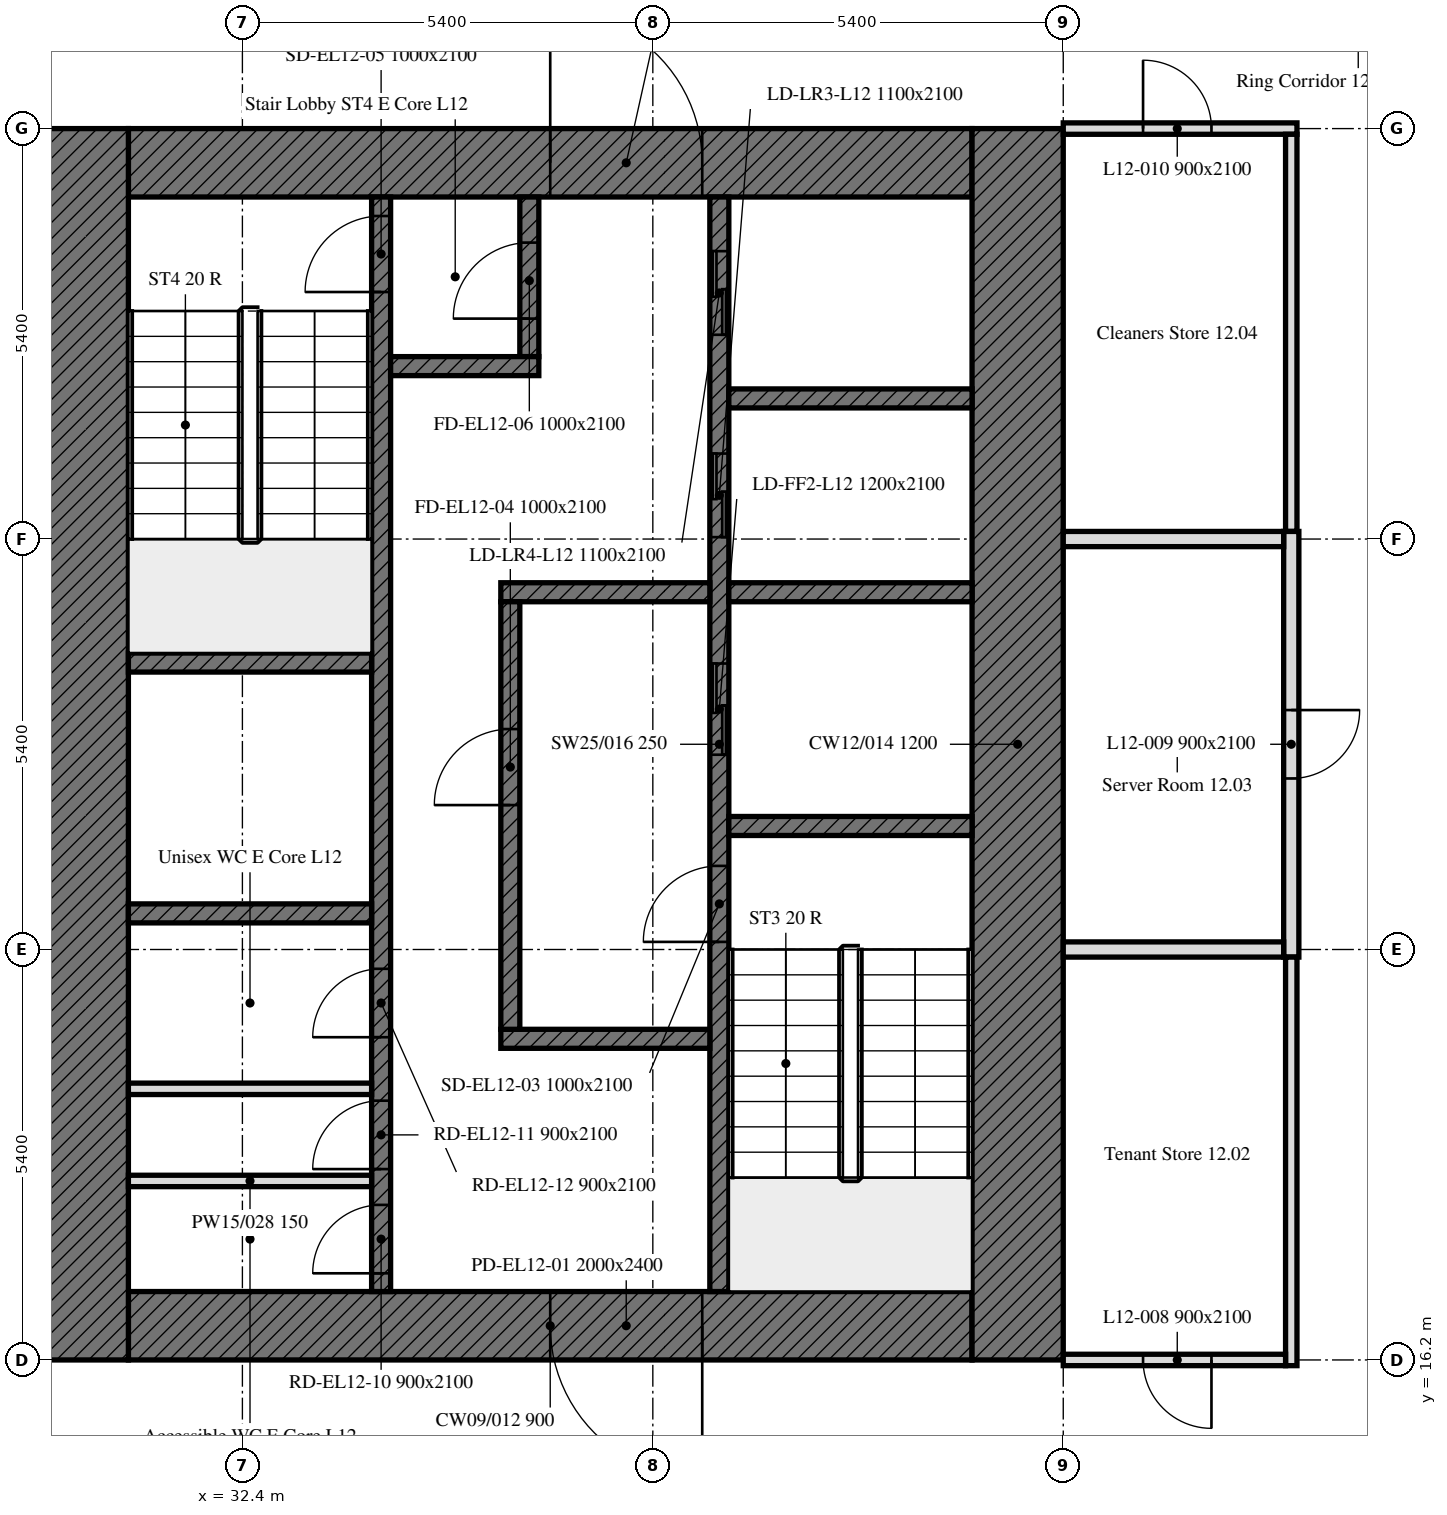
"""IFC4 building model, lengths in metres.
Left out: names, types, materials, properties, quantities, classifications, styles, units other than length and angle.
Written with IfcOpenShell. Run it as: python <this file> out.ifc"""

import sys

from ifc_helpers import new_model, si_unit, direction, frame, frame_2d, origin, place, context, subcontext, project, spatial, rectangle, extrude, element, fill, save


model = new_model("IFC4")
c1 = context("Model", 3, precision=1e-05, world=origin(), true_north=direction((0.0, 1.0)))
c2 = subcontext(c1, "Body", "Model", "MODEL_VIEW")
j1 = project(units=[si_unit("LENGTHUNIT", "METRE"), si_unit("PLANEANGLEUNIT", "RADIAN")], contexts=[c1])
p1 = place(None, origin())
s1 = spatial("IfcSite", under=j1, at=p1, CompositionType="ELEMENT")
p2 = place(p1, origin())
s2 = spatial("IfcBuilding", under=s1, at=p2, CompositionType="ELEMENT")
p3 = place(p2, frame((0.0, 0.0, 56.4)))
s3 = spatial("IfcBuildingStorey", under=s2, at=p3, CompositionType="ELEMENT", Elevation=56.4)
p4 = place(p3, frame((42.0, 16.65, 0.0), z_axis=(0.0, 0.0, 1.0), x_axis=(-1.0, 0.0, 0.0)))
e1 = element("IfcWall", 1, at=p4, inside=s3, PredefinedType="SOLIDWALL", context=c2, shape_type="SweptSolid", body=[
    extrude(rectangle(XDim=11.1, YDim=0.9, at=frame_2d((5.55, 0.0))), origin(), (0.0, 0.0, 1.0), 3.3),
])
p5 = place(p4, frame((3.55, 0.0, 0.0)))
e2 = element("IfcOpeningElement", 2, at=p5, cuts=e1, PredefinedType="OPENING", context=c2, shape_type="SweptSolid", body=[
    extrude(rectangle(XDim=2.0, YDim=2.4, at=frame_2d((1.0, 1.2))), frame((0.0, 0.45, 0.0), z_axis=(0.0, -1.0, 0.0), x_axis=(1.0, 0.0, 0.0)), (0.0, 0.0, 1.0), 0.9),
])
p6 = place(p3, frame((30.9, 31.95, 0.0), z_axis=(0.0, 0.0, 1.0), x_axis=(1.0, 0.0, 0.0)))
e3 = element("IfcWall", 3, at=p6, inside=s3, PredefinedType="SOLIDWALL", context=c2, shape_type="SweptSolid", body=[
    extrude(rectangle(XDim=11.1, YDim=0.9, at=frame_2d((5.55, 0.0))), origin(), (0.0, 0.0, 1.0), 3.3),
])
p7 = place(p6, frame((5.55, 0.0, 0.0)))
e4 = element("IfcOpeningElement", 4, at=p7, cuts=e3, PredefinedType="OPENING", context=c2, shape_type="SweptSolid", body=[
    extrude(rectangle(XDim=2.0, YDim=2.4, at=frame_2d((1.0, 1.2))), frame((0.0, 0.45, 0.0), z_axis=(0.0, -1.0, 0.0), x_axis=(1.0, 0.0, 0.0)), (0.0, 0.0, 1.0), 0.9),
])
for number, where, z_axis, x_axis in (
    (5, (42.6, 32.4, 0.0), (0.0, 0.0, 1.0), (0.0, -1.0, 0.0)),
    (6, (30.3, 16.2, 0.0), (0.0, 0.0, 1.0), (0.0, 1.0, 0.0)),
):
    element("IfcWall", number, at=place(p3, frame(where, z_axis=z_axis, x_axis=x_axis)), inside=s3, PredefinedType="SOLIDWALL", context=c2, shape_type="SweptSolid", body=[
        extrude(rectangle(XDim=16.2, YDim=1.2, at=frame_2d((8.1, 0.0))), origin(), (0.0, 0.0, 1.0), 3.3),
    ])
p8 = place(p3, frame((38.675, 17.1, 0.0), z_axis=(0.0, 0.0, 1.0), x_axis=(0.0, 1.0, 0.0)))
e7 = element("IfcWall", 7, at=p8, inside=s3, PredefinedType="SOLIDWALL", context=c2, shape_type="SweptSolid", body=[
    extrude(rectangle(XDim=14.4, YDim=0.25, at=frame_2d((7.2, 0.0))), origin(), (0.0, 0.0, 1.0), 3.3),
])
p9 = place(p8, frame((4.6, 0.0, 0.0)))
e8 = element("IfcOpeningElement", 8, at=p9, cuts=e7, PredefinedType="OPENING", context=c2, shape_type="SweptSolid", body=[
    extrude(rectangle(XDim=1.0, YDim=2.1, at=frame_2d((0.5, 1.05))), frame((0.0, 0.125, 0.0), z_axis=(0.0, -1.0, 0.0), x_axis=(1.0, 0.0, 0.0)), (0.0, 0.0, 1.0), 0.25),
])
p10 = place(p8, frame((7.062, 0.0, 0.0)))
e9 = element("IfcOpeningElement", 9, at=p10, cuts=e7, PredefinedType="OPENING", context=c2, shape_type="SweptSolid", body=[
    extrude(rectangle(XDim=1.2, YDim=2.1, at=frame_2d((0.6, 1.05))), frame((0.0, 0.125, 0.0), z_axis=(0.0, -1.0, 0.0), x_axis=(1.0, 0.0, 0.0)), (0.0, 0.0, 1.0), 0.25),
])
p11 = place(p8, frame((9.925, 0.0, 0.0)))
e10 = element("IfcOpeningElement", 10, at=p11, cuts=e7, PredefinedType="OPENING", context=c2, shape_type="SweptSolid", body=[
    extrude(rectangle(XDim=1.1, YDim=2.1, at=frame_2d((0.55, 1.05))), frame((0.0, 0.125, 0.0), z_axis=(0.0, -1.0, 0.0), x_axis=(1.0, 0.0, 0.0)), (0.0, 0.0, 1.0), 0.25),
])
p12 = place(p8, frame((12.587, 0.0, 0.0)))
e11 = element("IfcOpeningElement", 11, at=p12, cuts=e7, PredefinedType="OPENING", context=c2, shape_type="SweptSolid", body=[
    extrude(rectangle(XDim=1.1, YDim=2.1, at=frame_2d((0.55, 1.05))), frame((0.0, 0.125, 0.0), z_axis=(0.0, -1.0, 0.0), x_axis=(1.0, 0.0, 0.0)), (0.0, 0.0, 1.0), 0.25),
])
p13 = place(p3, frame((34.225, 17.1, 0.0), z_axis=(0.0, 0.0, 1.0), x_axis=(0.0, 1.0, 0.0)))
e12 = element("IfcWall", 12, at=p13, inside=s3, PredefinedType="SOLIDWALL", context=c2, shape_type="SweptSolid", body=[
    extrude(rectangle(XDim=14.4, YDim=0.25, at=frame_2d((7.2, 0.0))), origin(), (0.0, 0.0, 1.0), 3.3),
])
p14 = place(p13, frame((13.15, 0.0, 0.0)))
e13 = element("IfcOpeningElement", 13, at=p14, cuts=e12, PredefinedType="OPENING", context=c2, shape_type="SweptSolid", body=[
    extrude(rectangle(XDim=1.0, YDim=2.1, at=frame_2d((0.5, 1.05))), frame((0.0, 0.125, 0.0), z_axis=(0.0, -1.0, 0.0), x_axis=(1.0, 0.0, 0.0)), (0.0, 0.0, 1.0), 0.25),
])
p15 = place(p13, frame((0.24, 0.0, 0.0)))
e14 = element("IfcOpeningElement", 14, at=p15, cuts=e12, PredefinedType="OPENING", context=c2, shape_type="SweptSolid", body=[
    extrude(rectangle(XDim=0.9, YDim=2.1, at=frame_2d((0.45, 1.05))), frame((0.0, 0.125, 0.0), z_axis=(0.0, -1.0, 0.0), x_axis=(1.0, 0.0, 0.0)), (0.0, 0.0, 1.0), 0.25),
])
p16 = place(p13, frame((1.611, 0.0, 0.0)))
e15 = element("IfcOpeningElement", 15, at=p16, cuts=e12, PredefinedType="OPENING", context=c2, shape_type="SweptSolid", body=[
    extrude(rectangle(XDim=0.9, YDim=2.1, at=frame_2d((0.45, 1.05))), frame((0.0, 0.125, 0.0), z_axis=(0.0, -1.0, 0.0), x_axis=(1.0, 0.0, 0.0)), (0.0, 0.0, 1.0), 0.25),
])
p17 = place(p13, frame((3.346, 0.0, 0.0)))
e16 = element("IfcOpeningElement", 16, at=p17, cuts=e12, PredefinedType="OPENING", context=c2, shape_type="SweptSolid", body=[
    extrude(rectangle(XDim=0.9, YDim=2.1, at=frame_2d((0.45, 1.05))), frame((0.0, 0.125, 0.0), z_axis=(0.0, -1.0, 0.0), x_axis=(1.0, 0.0, 0.0)), (0.0, 0.0, 1.0), 0.25),
])
p18 = place(p3, frame((38.8, 23.225, 0.0), z_axis=(0.0, 0.0, 1.0), x_axis=(1.0, 0.0, 0.0)))
e17 = element("IfcWall", 17, at=p18, inside=s3, PredefinedType="SOLIDWALL", context=c2, shape_type="SweptSolid", body=[
    extrude(rectangle(XDim=3.2, YDim=0.25, at=frame_2d((1.6, 0.0))), origin(), (0.0, 0.0, 1.0), 3.3),
])
for number, where, z_axis, x_axis in (
    (18, (30.9, 25.375, 0.0), (0.0, 0.0, 1.0), (1.0, 0.0, 0.0)),
    (19, (30.9, 22.075, 0.0), (0.0, 0.0, 1.0), (1.0, 0.0, 0.0)),
):
    element("IfcWall", number, at=place(p3, frame(where, z_axis=z_axis, x_axis=x_axis)), inside=s3, PredefinedType="SOLIDWALL", context=c2, shape_type="SweptSolid", body=[
        extrude(rectangle(XDim=3.2, YDim=0.25, at=frame_2d((1.6, 0.0))), origin(), (0.0, 0.0, 1.0), 3.3),
    ])
p19 = place(p3, frame((38.8, 26.3, 0.0), z_axis=(0.0, 0.0, 1.0), x_axis=(1.0, 0.0, 0.0)))
e20 = element("IfcWall", 20, at=p19, inside=s3, PredefinedType="SOLIDWALL", context=c2, shape_type="SweptSolid", body=[
    extrude(rectangle(XDim=3.2, YDim=0.25, at=frame_2d((1.6, 0.0))), origin(), (0.0, 0.0, 1.0), 3.3),
])
for number, where, z_axis, x_axis in (
    (21, (35.8, 26.3, 0.0), (0.0, 0.0, 1.0), (1.0, 0.0, 0.0)),
    (22, (35.8, 20.425, 0.0), (0.0, 0.0, 1.0), (1.0, 0.0, 0.0)),
):
    element("IfcWall", number, at=place(p3, frame(where, z_axis=z_axis, x_axis=x_axis)), inside=s3, PredefinedType="SOLIDWALL", context=c2, shape_type="SweptSolid", body=[
        extrude(rectangle(XDim=2.75, YDim=0.25, at=frame_2d((1.375, 0.0))), origin(), (0.0, 0.0, 1.0), 3.3),
    ])
p20 = place(p3, frame((36.175, 29.4, 0.0), z_axis=(0.0, 0.0, 1.0), x_axis=(0.0, 1.0, 0.0)))
e23 = element("IfcWall", 23, at=p20, inside=s3, PredefinedType="SOLIDWALL", context=c2, shape_type="SweptSolid", body=[
    extrude(rectangle(XDim=2.1, YDim=0.25, at=frame_2d((1.05, 0.0))), origin(), (0.0, 0.0, 1.0), 3.3),
])
p21 = place(p20, frame((0.5, 0.0, 0.0)))
e24 = element("IfcOpeningElement", 24, at=p21, cuts=e23, PredefinedType="OPENING", context=c2, shape_type="SweptSolid", body=[
    extrude(rectangle(XDim=1.0, YDim=2.1, at=frame_2d((0.5, 1.05))), frame((0.0, 0.125, 0.0), z_axis=(0.0, -1.0, 0.0), x_axis=(1.0, 0.0, 0.0)), (0.0, 0.0, 1.0), 0.25),
])
p22 = place(p3, frame((34.35, 29.275, 0.0), z_axis=(0.0, 0.0, 1.0), x_axis=(1.0, 0.0, 0.0)))
e25 = element("IfcWall", 25, at=p22, inside=s3, PredefinedType="SOLIDWALL", context=c2, shape_type="SweptSolid", body=[
    extrude(rectangle(XDim=1.95, YDim=0.25, at=frame_2d((0.975, 0.0))), origin(), (0.0, 0.0, 1.0), 3.3),
])
p23 = place(p3, frame((35.925, 20.55, 0.0), z_axis=(0.0, 0.0, 1.0), x_axis=(0.0, 1.0, 0.0)))
e26 = element("IfcWall", 26, at=p23, inside=s3, PredefinedType="SOLIDWALL", context=c2, shape_type="SweptSolid", body=[
    extrude(rectangle(XDim=5.625, YDim=0.25, at=frame_2d((2.812, 0.0))), origin(), (0.0, 0.0, 1.0), 3.3),
])
p24 = place(p23, frame((2.95, 0.0, 0.0)))
e27 = element("IfcOpeningElement", 27, at=p24, cuts=e26, PredefinedType="OPENING", context=c2, shape_type="SweptSolid", body=[
    extrude(rectangle(XDim=1.0, YDim=2.1, at=frame_2d((0.5, 1.05))), frame((0.0, 0.125, 0.0), z_axis=(0.0, -1.0, 0.0), x_axis=(1.0, 0.0, 0.0)), (0.0, 0.0, 1.0), 0.25),
])
p25 = place(p3, frame((38.8, 28.85, 0.0), z_axis=(0.0, 0.0, 1.0), x_axis=(1.0, 0.0, 0.0)))
e28 = element("IfcWall", 28, at=p25, inside=s3, PredefinedType="SOLIDWALL", context=c2, shape_type="SweptSolid", body=[
    extrude(rectangle(XDim=3.2, YDim=0.25, at=frame_2d((1.6, 0.0))), origin(), (0.0, 0.0, 1.0), 3.3),
])
for number, where, z_axis, x_axis in (
    (29, (30.9, 18.555, 0.0), (0.0, 0.0, 1.0), (1.0, 0.0, 0.0)),
    (30, (30.9, 19.767, 0.0), (0.0, 0.0, 1.0), (1.0, 0.0, 0.0)),
):
    element("IfcWall", number, at=place(p3, frame(where, z_axis=z_axis, x_axis=x_axis)), inside=s3, PredefinedType="PARTITIONING", context=c2, shape_type="SweptSolid", body=[
        extrude(rectangle(XDim=3.2, YDim=0.15, at=frame_2d((1.6, 0.0))), origin(), (0.0, 0.0, 1.0), 3.3),
    ])
p26 = place(p3, frame((43.2, 32.4, 0.0), z_axis=(0.0, 0.0, 1.0), x_axis=(1.0, 0.0, 0.0)))
e31 = element("IfcWall", 31, at=p26, inside=s3, PredefinedType="PARTITIONING", context=c2, shape_type="SweptSolid", body=[
    extrude(rectangle(XDim=3.075, YDim=0.15, at=frame_2d((1.538, 0.0))), origin(), (0.0, 0.0, 1.0), 2.55),
])
p27 = place(p26, frame((1.05, 0.0, 0.0)))
e32 = element("IfcOpeningElement", 32, at=p27, cuts=e31, PredefinedType="OPENING", context=c2, shape_type="SweptSolid", body=[
    extrude(rectangle(XDim=0.9, YDim=2.1, at=frame_2d((0.45, 1.05))), frame((0.0, 0.075, 0.0), z_axis=(0.0, -1.0, 0.0), x_axis=(1.0, 0.0, 0.0)), (0.0, 0.0, 1.0), 0.15),
])
p28 = place(p3, frame((46.2, 32.325, 0.0), z_axis=(0.0, 0.0, 1.0), x_axis=(0.0, -1.0, 0.0)))
e33 = element("IfcWall", 33, at=p28, inside=s3, PredefinedType="PARTITIONING", context=c2, shape_type="SweptSolid", body=[
    extrude(rectangle(XDim=5.225, YDim=0.15, at=frame_2d((2.612, 0.0))), origin(), (0.0, 0.0, 1.0), 3.3),
])
p29 = place(p3, frame((46.2, 27.1, 0.0), z_axis=(0.0, 0.0, 1.0), x_axis=(0.0, -1.0, 0.0)))
e34 = element("IfcWall", 34, at=p29, inside=s3, PredefinedType="PARTITIONING", context=c2, shape_type="SweptSolid", body=[
    extrude(rectangle(XDim=5.6, YDim=0.2, at=frame_2d((2.8, 0.0))), origin(), (0.0, 0.0, 1.0), 3.3),
])
p30 = place(p29, frame((2.35, 0.0, 0.0)))
e35 = element("IfcOpeningElement", 35, at=p30, cuts=e34, PredefinedType="OPENING", context=c2, shape_type="SweptSolid", body=[
    extrude(rectangle(XDim=0.9, YDim=2.1, at=frame_2d((0.45, 1.05))), frame((0.0, 0.1, 0.0), z_axis=(0.0, -1.0, 0.0), x_axis=(1.0, 0.0, 0.0)), (0.0, 0.0, 1.0), 0.2),
])
p31 = place(p3, frame((46.2, 21.5, 0.0), z_axis=(0.0, 0.0, 1.0), x_axis=(0.0, -1.0, 0.0)))
e36 = element("IfcWall", 36, at=p31, inside=s3, PredefinedType="PARTITIONING", context=c2, shape_type="SweptSolid", body=[
    extrude(rectangle(XDim=5.375, YDim=0.15, at=frame_2d((2.688, 0.0))), origin(), (0.0, 0.0, 1.0), 3.3),
])
p32 = place(p3, frame((46.125, 16.2, 0.0), z_axis=(0.0, 0.0, 1.0), x_axis=(-1.0, 0.0, 0.0)))
e37 = element("IfcWall", 37, at=p32, inside=s3, PredefinedType="PARTITIONING", context=c2, shape_type="SweptSolid", body=[
    extrude(rectangle(XDim=2.925, YDim=0.15, at=frame_2d((1.462, 0.0))), origin(), (0.0, 0.0, 1.0), 2.55),
])
p33 = place(p32, frame((0.975, 0.0, 0.0)))
e38 = element("IfcOpeningElement", 38, at=p33, cuts=e37, PredefinedType="OPENING", context=c2, shape_type="SweptSolid", body=[
    extrude(rectangle(XDim=0.9, YDim=2.1, at=frame_2d((0.45, 1.05))), frame((0.0, 0.075, 0.0), z_axis=(0.0, -1.0, 0.0), x_axis=(1.0, 0.0, 0.0)), (0.0, 0.0, 1.0), 0.15),
])
for number, where, z_axis, x_axis in (
    (39, (46.1, 21.6, 0.0), (0.0, 0.0, 1.0), (-1.0, 0.0, 0.0)),
    (40, (46.1, 27.0, 0.0), (0.0, 0.0, 1.0), (-1.0, 0.0, 0.0)),
):
    element("IfcWall", number, at=place(p3, frame(where, z_axis=z_axis, x_axis=x_axis)), inside=s3, PredefinedType="PARTITIONING", context=c2, shape_type="SweptSolid", body=[
        extrude(rectangle(XDim=2.9, YDim=0.2, at=frame_2d((1.45, 0.0))), origin(), (0.0, 0.0, 1.0), 2.55),
    ])
p34 = place(p5, origin())
e41 = element("IfcDoor", 41, at=p34, inside=s3, OperationType="DOUBLE_DOOR_SINGLE_SWING", PredefinedType="DOOR", context=c2, shape_type="SweptSolid", body=[
    extrude(rectangle(XDim=2.0, YDim=2.4, at=frame_2d((1.0, 1.2))), frame((0.0, 0.025, 0.0), z_axis=(0.0, -1.0, 0.0), x_axis=(1.0, 0.0, 0.0)), (0.0, 0.0, 1.0), 0.05),
])
fill(e2, e41)
p35 = place(p7, origin())
e42 = element("IfcDoor", 42, at=p35, inside=s3, OperationType="DOUBLE_DOOR_SINGLE_SWING", PredefinedType="DOOR", context=c2, shape_type="SweptSolid", body=[
    extrude(rectangle(XDim=2.0, YDim=2.4, at=frame_2d((1.0, 1.2))), frame((0.0, 0.025, 0.0), z_axis=(0.0, -1.0, 0.0), x_axis=(1.0, 0.0, 0.0)), (0.0, 0.0, 1.0), 0.05),
])
fill(e4, e42)
p36 = place(p9, origin())
e43 = element("IfcDoor", 43, at=p36, inside=s3, OperationType="SINGLE_SWING_LEFT", PredefinedType="DOOR", context=c2, shape_type="SweptSolid", body=[
    extrude(rectangle(XDim=1.0, YDim=2.1, at=frame_2d((0.5, 1.05))), frame((0.0, 0.025, 0.0), z_axis=(0.0, -1.0, 0.0), x_axis=(1.0, 0.0, 0.0)), (0.0, 0.0, 1.0), 0.05),
])
fill(e8, e43)
p37 = place(p24, origin())
e44 = element("IfcDoor", 44, at=p37, inside=s3, OperationType="SINGLE_SWING_LEFT", PredefinedType="DOOR", context=c2, shape_type="SweptSolid", body=[
    extrude(rectangle(XDim=1.0, YDim=2.1, at=frame_2d((0.5, 1.05))), frame((0.0, 0.025, 0.0), z_axis=(0.0, -1.0, 0.0), x_axis=(1.0, 0.0, 0.0)), (0.0, 0.0, 1.0), 0.05),
])
fill(e27, e44)
p38 = place(p14, origin())
e45 = element("IfcDoor", 45, at=p38, inside=s3, OperationType="SINGLE_SWING_LEFT", PredefinedType="DOOR", context=c2, shape_type="SweptSolid", body=[
    extrude(rectangle(XDim=1.0, YDim=2.1, at=frame_2d((0.5, 1.05))), frame((0.0, 0.025, 0.0), z_axis=(0.0, -1.0, 0.0), x_axis=(1.0, 0.0, 0.0)), (0.0, 0.0, 1.0), 0.05),
])
fill(e13, e45)
p39 = place(p21, origin())
e46 = element("IfcDoor", 46, at=p39, inside=s3, OperationType="SINGLE_SWING_LEFT", PredefinedType="DOOR", context=c2, shape_type="SweptSolid", body=[
    extrude(rectangle(XDim=1.0, YDim=2.1, at=frame_2d((0.5, 1.05))), frame((0.0, 0.025, 0.0), z_axis=(0.0, -1.0, 0.0), x_axis=(1.0, 0.0, 0.0)), (0.0, 0.0, 1.0), 0.05),
])
fill(e24, e46)
p40 = place(p10, origin())
e47 = element("IfcDoor", 47, at=p40, inside=s3, OperationType="DOUBLE_DOOR_SLIDING", PredefinedType="DOOR", context=c2, shape_type="SweptSolid", body=[
    extrude(rectangle(XDim=1.2, YDim=2.1, at=frame_2d((0.6, 1.05))), frame((0.0, 0.025, 0.0), z_axis=(0.0, -1.0, 0.0), x_axis=(1.0, 0.0, 0.0)), (0.0, 0.0, 1.0), 0.05),
])
fill(e9, e47)
p41 = place(p11, origin())
e48 = element("IfcDoor", 48, at=p41, inside=s3, OperationType="DOUBLE_DOOR_SLIDING", PredefinedType="DOOR", context=c2, shape_type="SweptSolid", body=[
    extrude(rectangle(XDim=1.1, YDim=2.1, at=frame_2d((0.55, 1.05))), frame((0.0, 0.025, 0.0), z_axis=(0.0, -1.0, 0.0), x_axis=(1.0, 0.0, 0.0)), (0.0, 0.0, 1.0), 0.05),
])
fill(e10, e48)
p42 = place(p12, origin())
e49 = element("IfcDoor", 49, at=p42, inside=s3, OperationType="DOUBLE_DOOR_SLIDING", PredefinedType="DOOR", context=c2, shape_type="SweptSolid", body=[
    extrude(rectangle(XDim=1.1, YDim=2.1, at=frame_2d((0.55, 1.05))), frame((0.0, 0.025, 0.0), z_axis=(0.0, -1.0, 0.0), x_axis=(1.0, 0.0, 0.0)), (0.0, 0.0, 1.0), 0.05),
])
fill(e11, e49)
p43 = place(p15, origin())
e50 = element("IfcDoor", 50, at=p43, inside=s3, OperationType="SINGLE_SWING_LEFT", PredefinedType="DOOR", context=c2, shape_type="SweptSolid", body=[
    extrude(rectangle(XDim=0.9, YDim=2.1, at=frame_2d((0.45, 1.05))), frame((0.0, 0.025, 0.0), z_axis=(0.0, -1.0, 0.0), x_axis=(1.0, 0.0, 0.0)), (0.0, 0.0, 1.0), 0.05),
])
fill(e14, e50)
p44 = place(p16, origin())
e51 = element("IfcDoor", 51, at=p44, inside=s3, OperationType="SINGLE_SWING_LEFT", PredefinedType="DOOR", context=c2, shape_type="SweptSolid", body=[
    extrude(rectangle(XDim=0.9, YDim=2.1, at=frame_2d((0.45, 1.05))), frame((0.0, 0.025, 0.0), z_axis=(0.0, -1.0, 0.0), x_axis=(1.0, 0.0, 0.0)), (0.0, 0.0, 1.0), 0.05),
])
fill(e15, e51)
p45 = place(p17, origin())
e52 = element("IfcDoor", 52, at=p45, inside=s3, OperationType="SINGLE_SWING_LEFT", PredefinedType="DOOR", context=c2, shape_type="SweptSolid", body=[
    extrude(rectangle(XDim=0.9, YDim=2.1, at=frame_2d((0.45, 1.05))), frame((0.0, 0.025, 0.0), z_axis=(0.0, -1.0, 0.0), x_axis=(1.0, 0.0, 0.0)), (0.0, 0.0, 1.0), 0.05),
])
fill(e16, e52)
p46 = place(p33, origin())
e53 = element("IfcDoor", 53, at=p46, inside=s3, OperationType="SINGLE_SWING_LEFT", PredefinedType="DOOR", context=c2, shape_type="SweptSolid", body=[
    extrude(rectangle(XDim=0.9, YDim=2.1, at=frame_2d((0.45, 1.05))), frame((0.0, 0.025, 0.0), z_axis=(0.0, -1.0, 0.0), x_axis=(1.0, 0.0, 0.0)), (0.0, 0.0, 1.0), 0.05),
])
fill(e38, e53)
p47 = place(p30, origin())
e54 = element("IfcDoor", 54, at=p47, inside=s3, OperationType="SINGLE_SWING_LEFT", PredefinedType="DOOR", context=c2, shape_type="SweptSolid", body=[
    extrude(rectangle(XDim=0.9, YDim=2.1, at=frame_2d((0.45, 1.05))), frame((0.0, 0.025, 0.0), z_axis=(0.0, -1.0, 0.0), x_axis=(1.0, 0.0, 0.0)), (0.0, 0.0, 1.0), 0.05),
])
fill(e35, e54)
p48 = place(p27, origin())
e55 = element("IfcDoor", 55, at=p48, inside=s3, OperationType="SINGLE_SWING_LEFT", PredefinedType="DOOR", context=c2, shape_type="SweptSolid", body=[
    extrude(rectangle(XDim=0.9, YDim=2.1, at=frame_2d((0.45, 1.05))), frame((0.0, 0.025, 0.0), z_axis=(0.0, -1.0, 0.0), x_axis=(1.0, 0.0, 0.0)), (0.0, 0.0, 1.0), 0.05),
])
fill(e32, e55)
save(model, sys.argv[1])
